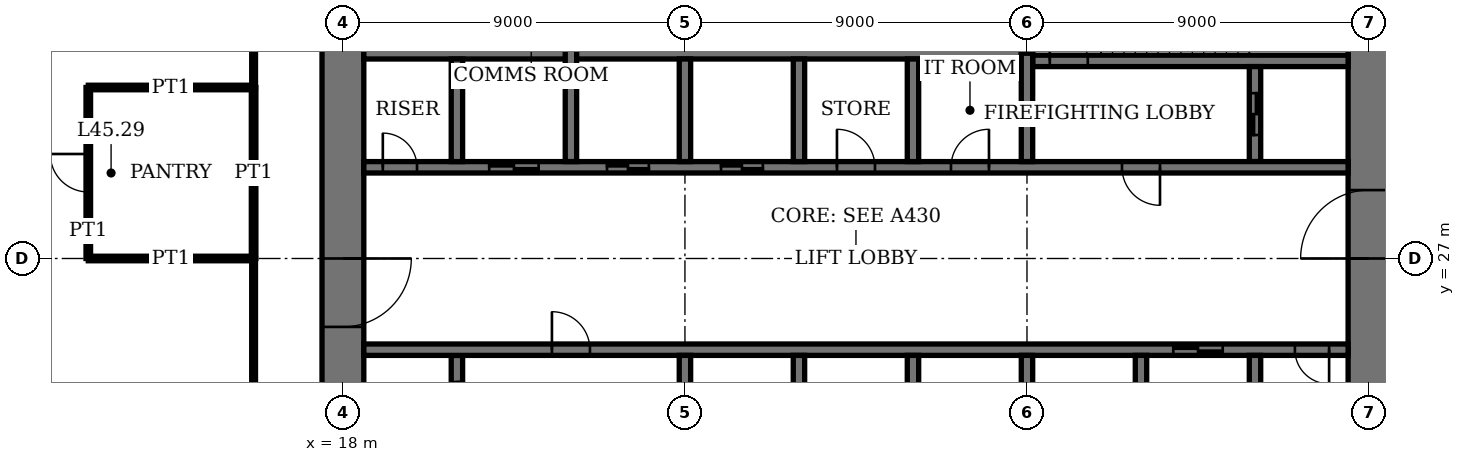
"""IFC4 building model, lengths in metres.
Left out: names, types, materials, properties, quantities, classifications, styles, units other than length and angle.
Written with IfcOpenShell. Run it as: python <this file> out.ifc"""

import sys

from ifc_helpers import new_model, si_unit, direction, frame, frame_2d, origin, place, context, subcontext, project, spatial, rectangle, extrude, element, fill, save


model = new_model("IFC4")
c1 = context("Model", 3, precision=1e-05, world=origin(), true_north=direction((0.0, 1.0)))
c2 = subcontext(c1, "Body", "Model", "MODEL_VIEW")
j1 = project(units=[si_unit("LENGTHUNIT", "METRE"), si_unit("PLANEANGLEUNIT", "RADIAN")], contexts=[c1])
p1 = place(None, origin())
s1 = spatial("IfcSite", under=j1, at=p1, CompositionType="ELEMENT")
p2 = place(p1, origin())
s2 = spatial("IfcBuilding", under=s1, at=p2, CompositionType="ELEMENT")
p3 = place(p2, frame((0.0, 0.0, 186.2)))
s3 = spatial("IfcBuildingStorey", under=s2, at=p3, CompositionType="ELEMENT", Elevation=186.2)
p4 = place(p3, frame((18.0, 35.45, 0.0), z_axis=(0.0, 0.0, 1.0), x_axis=(0.0, -1.0, 0.0)))
e1 = element("IfcWall", 1, at=p4, inside=s3, PredefinedType="SHEAR", context=c2, shape_type="SweptSolid", body=[
    extrude(rectangle(XDim=16.9, YDim=1.1, at=frame_2d((8.45, 0.0))), origin(), (0.0, 0.0, 1.0), 4.0),
])
p5 = place(p4, frame((8.45, 0.0, 0.0)))
e2 = element("IfcOpeningElement", 2, at=p5, cuts=e1, PredefinedType="OPENING", context=c2, shape_type="SweptSolid", body=[
    extrude(rectangle(XDim=1.8, YDim=2.4, at=frame_2d((0.9, 1.2))), frame((0.0, 0.56, 0.0), z_axis=(0.0, -1.0, 0.0), x_axis=(1.0, 0.0, 0.0)), (0.0, 0.0, 1.0), 1.12),
])
p6 = place(p3, frame((45.0, 18.55, 0.0), z_axis=(0.0, 0.0, 1.0), x_axis=(0.0, 1.0, 0.0)))
e3 = element("IfcWall", 3, at=p6, inside=s3, PredefinedType="SHEAR", context=c2, shape_type="SweptSolid", body=[
    extrude(rectangle(XDim=16.9, YDim=1.1, at=frame_2d((8.45, 0.0))), origin(), (0.0, 0.0, 1.0), 4.0),
])
p7 = place(p6, frame((8.45, 0.0, 0.0)))
e4 = element("IfcOpeningElement", 4, at=p7, cuts=e3, PredefinedType="OPENING", context=c2, shape_type="SweptSolid", body=[
    extrude(rectangle(XDim=1.8, YDim=2.4, at=frame_2d((0.9, 1.2))), frame((0.0, 0.56, 0.0), z_axis=(0.0, -1.0, 0.0), x_axis=(1.0, 0.0, 0.0)), (0.0, 0.0, 1.0), 1.12),
])
p8 = place(p3, frame((36.15, 32.2, 0.0), z_axis=(0.0, 0.0, 1.0), x_axis=(1.0, 0.0, 0.0)))
e5 = element("IfcWall", 5, at=p8, inside=s3, PredefinedType="SHEAR", context=c2, shape_type="SweptSolid", body=[
    extrude(rectangle(XDim=8.3, YDim=0.3, at=frame_2d((4.15, 0.0))), origin(), (0.0, 0.0, 1.0), 4.0),
])
p9 = place(p8, frame((0.45, 0.0, 0.0)))
e6 = element("IfcOpeningElement", 6, at=p9, cuts=e5, PredefinedType="OPENING", context=c2, shape_type="SweptSolid", body=[
    extrude(rectangle(XDim=1.0, YDim=2.4, at=frame_2d((0.5, 1.2))), frame((0.0, 0.16, 0.0), z_axis=(0.0, -1.0, 0.0), x_axis=(1.0, 0.0, 0.0)), (0.0, 0.0, 1.0), 0.32),
])
p10 = place(p3, frame((36.0, 32.4, 0.0), z_axis=(0.0, 0.0, 1.0), x_axis=(0.0, 1.0, 0.0)))
e7 = element("IfcWall", 7, at=p10, inside=s3, PredefinedType="SHEAR", context=c2, shape_type="SweptSolid", body=[
    extrude(rectangle(XDim=3.05, YDim=0.3, at=frame_2d((1.525, 0.0))), origin(), (0.0, 0.0, 1.0), 4.0),
])
p11 = place(p3, frame((21.0, 21.95, 0.0), z_axis=(0.0, 0.0, 1.0), x_axis=(0.0, 1.0, 0.0)))
e8 = element("IfcWall", 8, at=p11, inside=s3, PredefinedType="SHEAR", context=c2, shape_type="SweptSolid", body=[
    extrude(rectangle(XDim=2.5, YDim=0.3, at=frame_2d((1.25, 0.0))), origin(), (0.0, 0.0, 1.0), 4.0),
])
p12 = place(p11, frame((0.7, 0.0, 0.0)))
e9 = element("IfcOpeningElement", 9, at=p12, cuts=e8, PredefinedType="OPENING", context=c2, shape_type="SweptSolid", body=[
    extrude(rectangle(XDim=1.1, YDim=2.4, at=frame_2d((0.55, 1.2))), frame((0.0, 0.16, 0.0), z_axis=(0.0, -1.0, 0.0), x_axis=(1.0, 0.0, 0.0)), (0.0, 0.0, 1.0), 0.32),
])
p13 = place(p3, frame((42.0, 29.55, 0.0), z_axis=(0.0, 0.0, 1.0), x_axis=(0.0, 1.0, 0.0)))
e10 = element("IfcWall", 10, at=p13, inside=s3, PredefinedType="SHEAR", context=c2, shape_type="SweptSolid", body=[
    extrude(rectangle(XDim=2.5, YDim=0.3, at=frame_2d((1.25, 0.0))), origin(), (0.0, 0.0, 1.0), 4.0),
])
p14 = place(p13, frame((0.7, 0.0, 0.0)))
e11 = element("IfcOpeningElement", 11, at=p14, cuts=e10, PredefinedType="OPENING", context=c2, shape_type="SweptSolid", body=[
    extrude(rectangle(XDim=1.1, YDim=2.4, at=frame_2d((0.55, 1.2))), frame((0.0, 0.16, 0.0), z_axis=(0.0, -1.0, 0.0), x_axis=(1.0, 0.0, 0.0)), (0.0, 0.0, 1.0), 0.32),
])
p15 = place(p3, frame((18.55, 24.6, 0.0), z_axis=(0.0, 0.0, 1.0), x_axis=(1.0, 0.0, 0.0)))
e12 = element("IfcWall", 12, at=p15, inside=s3, PredefinedType="SHEAR", context=c2, shape_type="SweptSolid", body=[
    extrude(rectangle(XDim=25.9, YDim=0.3, at=frame_2d((12.95, 0.0))), origin(), (0.0, 0.0, 1.0), 4.0),
])
p16 = place(p15, frame((4.95, 0.0, 0.0)))
e13 = element("IfcOpeningElement", 13, at=p16, cuts=e12, PredefinedType="OPENING", context=c2, shape_type="SweptSolid", body=[
    extrude(rectangle(XDim=1.0, YDim=2.4, at=frame_2d((0.5, 1.2))), frame((0.0, 0.16, 0.0), z_axis=(0.0, -1.0, 0.0), x_axis=(1.0, 0.0, 0.0)), (0.0, 0.0, 1.0), 0.32),
])
p17 = place(p15, frame((24.5, 0.0, 0.0)))
e14 = element("IfcOpeningElement", 14, at=p17, cuts=e12, PredefinedType="OPENING", context=c2, shape_type="SweptSolid", body=[
    extrude(rectangle(XDim=0.9, YDim=2.1, at=frame_2d((0.45, 1.05))), frame((0.0, 0.16, 0.0), z_axis=(0.0, -1.0, 0.0), x_axis=(1.0, 0.0, 0.0)), (0.0, 0.0, 1.0), 0.32),
])
p18 = place(p15, frame((21.3, 0.0, 0.0)))
e15 = element("IfcOpeningElement", 15, at=p18, cuts=e12, PredefinedType="OPENING", context=c2, shape_type="SweptSolid", body=[
    extrude(rectangle(XDim=1.3, YDim=2.4, at=frame_2d((0.65, 1.2))), frame((0.0, 0.16, 0.0), z_axis=(0.0, -1.0, 0.0), x_axis=(1.0, 0.0, 0.0)), (0.0, 0.0, 1.0), 0.32),
])
p19 = place(p3, frame((18.55, 29.4, 0.0), z_axis=(0.0, 0.0, 1.0), x_axis=(1.0, 0.0, 0.0)))
e16 = element("IfcWall", 16, at=p19, inside=s3, PredefinedType="SHEAR", context=c2, shape_type="SweptSolid", body=[
    extrude(rectangle(XDim=25.9, YDim=0.3, at=frame_2d((12.95, 0.0))), origin(), (0.0, 0.0, 1.0), 4.0),
])
p20 = place(p19, frame((19.95, 0.0, 0.0)))
e17 = element("IfcOpeningElement", 17, at=p20, cuts=e16, PredefinedType="OPENING", context=c2, shape_type="SweptSolid", body=[
    extrude(rectangle(XDim=1.0, YDim=2.4, at=frame_2d((0.5, 1.2))), frame((0.0, 0.16, 0.0), z_axis=(0.0, -1.0, 0.0), x_axis=(1.0, 0.0, 0.0)), (0.0, 0.0, 1.0), 0.32),
])
p21 = place(p19, frame((0.5, 0.0, 0.0)))
e18 = element("IfcOpeningElement", 18, at=p21, cuts=e16, PredefinedType="OPENING", context=c2, shape_type="SweptSolid", body=[
    extrude(rectangle(XDim=0.9, YDim=2.1, at=frame_2d((0.45, 1.05))), frame((0.0, 0.16, 0.0), z_axis=(0.0, -1.0, 0.0), x_axis=(1.0, 0.0, 0.0)), (0.0, 0.0, 1.0), 0.32),
])
p22 = place(p19, frame((15.45, 0.0, 0.0)))
e19 = element("IfcOpeningElement", 19, at=p22, cuts=e16, PredefinedType="OPENING", context=c2, shape_type="SweptSolid", body=[
    extrude(rectangle(XDim=1.0, YDim=2.4, at=frame_2d((0.5, 1.2))), frame((0.0, 0.16, 0.0), z_axis=(0.0, -1.0, 0.0), x_axis=(1.0, 0.0, 0.0)), (0.0, 0.0, 1.0), 0.32),
])
p23 = place(p19, frame((12.45, 0.0, 0.0)))
e20 = element("IfcOpeningElement", 20, at=p23, cuts=e16, PredefinedType="OPENING", context=c2, shape_type="SweptSolid", body=[
    extrude(rectangle(XDim=1.0, YDim=2.4, at=frame_2d((0.5, 1.2))), frame((0.0, 0.16, 0.0), z_axis=(0.0, -1.0, 0.0), x_axis=(1.0, 0.0, 0.0)), (0.0, 0.0, 1.0), 0.32),
])
p24 = place(p19, frame((9.4, 0.0, 0.0)))
e21 = element("IfcOpeningElement", 21, at=p24, cuts=e16, PredefinedType="OPENING", context=c2, shape_type="SweptSolid", body=[
    extrude(rectangle(XDim=1.1, YDim=2.4, at=frame_2d((0.55, 1.2))), frame((0.0, 0.16, 0.0), z_axis=(0.0, -1.0, 0.0), x_axis=(1.0, 0.0, 0.0)), (0.0, 0.0, 1.0), 0.32),
])
p25 = place(p19, frame((6.4, 0.0, 0.0)))
e22 = element("IfcOpeningElement", 22, at=p25, cuts=e16, PredefinedType="OPENING", context=c2, shape_type="SweptSolid", body=[
    extrude(rectangle(XDim=1.1, YDim=2.4, at=frame_2d((0.55, 1.2))), frame((0.0, 0.16, 0.0), z_axis=(0.0, -1.0, 0.0), x_axis=(1.0, 0.0, 0.0)), (0.0, 0.0, 1.0), 0.32),
])
p26 = place(p19, frame((3.3, 0.0, 0.0)))
e23 = element("IfcOpeningElement", 23, at=p26, cuts=e16, PredefinedType="OPENING", context=c2, shape_type="SweptSolid", body=[
    extrude(rectangle(XDim=1.3, YDim=2.4, at=frame_2d((0.65, 1.2))), frame((0.0, 0.16, 0.0), z_axis=(0.0, -1.0, 0.0), x_axis=(1.0, 0.0, 0.0)), (0.0, 0.0, 1.0), 0.32),
])
p27 = place(p3, frame((18.55, 32.4, 0.0), z_axis=(0.0, 0.0, 1.0), x_axis=(1.0, 0.0, 0.0)))
e24 = element("IfcWall", 24, at=p27, inside=s3, PredefinedType="SHEAR", context=c2, shape_type="SweptSolid", body=[
    extrude(rectangle(XDim=17.3, YDim=0.3, at=frame_2d((8.65, 0.0))), origin(), (0.0, 0.0, 1.0), 4.0),
])
for number, where, z_axis, x_axis in (
    (25, (30.0, 21.75, 0.0), (0.0, 0.0, 1.0), (0.0, 1.0, 0.0)),
    (26, (33.0, 29.55, 0.0), (0.0, 0.0, 1.0), (0.0, 1.0, 0.0)),
    (27, (33.0, 21.75, 0.0), (0.0, 0.0, 1.0), (0.0, 1.0, 0.0)),
    (28, (30.0, 29.55, 0.0), (0.0, 0.0, 1.0), (0.0, 1.0, 0.0)),
    (29, (36.0, 21.75, 0.0), (0.0, 0.0, 1.0), (0.0, 1.0, 0.0)),
    (30, (27.0, 29.55, 0.0), (0.0, 0.0, 1.0), (0.0, 1.0, 0.0)),
):
    element("IfcWall", number, at=place(p3, frame(where, z_axis=z_axis, x_axis=x_axis)), inside=s3, PredefinedType="SHEAR", context=c2, shape_type="SweptSolid", body=[
        extrude(rectangle(XDim=2.7, YDim=0.3, at=frame_2d((1.35, 0.0))), origin(), (0.0, 0.0, 1.0), 4.0),
    ])
for number, where, z_axis, x_axis in (
    (31, (39.0, 18.55, 0.0), (0.0, 0.0, 1.0), (0.0, 1.0, 0.0)),
    (32, (24.0, 29.55, 0.0), (0.0, 0.0, 1.0), (0.0, 1.0, 0.0)),
):
    element("IfcWall", number, at=place(p3, frame(where, z_axis=z_axis, x_axis=x_axis)), inside=s3, PredefinedType="SHEAR", context=c2, shape_type="SweptSolid", body=[
        extrude(rectangle(XDim=5.9, YDim=0.3, at=frame_2d((2.95, 0.0))), origin(), (0.0, 0.0, 1.0), 4.0),
    ])
for number, where, z_axis, x_axis in (
    (33, (42.0, 21.75, 0.0), (0.0, 0.0, 1.0), (0.0, 1.0, 0.0)),
    (34, (21.0, 29.55, 0.0), (0.0, 0.0, 1.0), (0.0, 1.0, 0.0)),
):
    element("IfcWall", number, at=place(p3, frame(where, z_axis=z_axis, x_axis=x_axis)), inside=s3, PredefinedType="SHEAR", context=c2, shape_type="SweptSolid", body=[
        extrude(rectangle(XDim=2.7, YDim=0.3, at=frame_2d((1.35, 0.0))), origin(), (0.0, 0.0, 1.0), 4.0),
    ])
for number, where, z_axis, x_axis in (
    (35, (27.0, 21.6, 0.0), (0.0, 0.0, 1.0), (0.0, 1.0, 0.0)),
    (36, (36.0, 29.55, 0.0), (0.0, 0.0, 1.0), (0.0, 1.0, 0.0)),
):
    element("IfcWall", number, at=place(p3, frame(where, z_axis=z_axis, x_axis=x_axis)), inside=s3, PredefinedType="SHEAR", context=c2, shape_type="SweptSolid", body=[
        extrude(rectangle(XDim=2.85, YDim=0.3, at=frame_2d((1.425, 0.0))), origin(), (0.0, 0.0, 1.0), 4.0),
    ])
p28 = place(p3, frame((11.3, 27.0, 0.0), z_axis=(0.0, 0.0, 1.0), x_axis=(1.0, 0.0, 0.0)))
e37 = element("IfcWall", 37, at=p28, inside=s3, PredefinedType="PARTITIONING", context=c2, shape_type="SweptSolid", body=[
    extrude(rectangle(XDim=4.35, YDim=0.12, at=frame_2d((2.175, 0.0))), origin(), (0.0, 0.0, 1.0), 3.05),
])
p29 = place(p3, frame((11.3, 31.5, 0.0), z_axis=(0.0, 0.0, 1.0), x_axis=(1.0, 0.0, 0.0)))
e38 = element("IfcWall", 38, at=p29, inside=s3, PredefinedType="PARTITIONING", context=c2, shape_type="SweptSolid", body=[
    extrude(rectangle(XDim=4.35, YDim=0.12, at=frame_2d((2.175, 0.0))), origin(), (0.0, 0.0, 1.0), 3.1),
])
p30 = place(p3, frame((11.3, 27.0, 0.0), z_axis=(0.0, 0.0, 1.0), x_axis=(0.0, 1.0, 0.0)))
e39 = element("IfcWall", 39, at=p30, inside=s3, PredefinedType="PARTITIONING", context=c2, shape_type="SweptSolid", body=[
    extrude(rectangle(XDim=4.5, YDim=0.12, at=frame_2d((2.25, 0.0))), origin(), (0.0, 0.0, 1.0), 3.75),
])
p31 = place(p30, frame((1.75, 0.0, 0.0)))
e40 = element("IfcOpeningElement", 40, at=p31, cuts=e39, PredefinedType="OPENING", context=c2, shape_type="SweptSolid", body=[
    extrude(rectangle(XDim=1.0, YDim=2.4, at=frame_2d((0.5, 1.2))), frame((0.0, 0.07, 0.0), z_axis=(0.0, -1.0, 0.0), x_axis=(1.0, 0.0, 0.0)), (0.0, 0.0, 1.0), 0.14),
])
p32 = place(p3, frame((15.65, 27.0, 0.0), z_axis=(0.0, 0.0, 1.0), x_axis=(0.0, 1.0, 0.0)))
e41 = element("IfcWall", 41, at=p32, inside=s3, PredefinedType="PARTITIONING", context=c2, shape_type="SweptSolid", body=[
    extrude(rectangle(XDim=4.5, YDim=0.12, at=frame_2d((2.25, 0.0))), origin(), (0.0, 0.0, 1.0), 3.75),
])
p33 = place(p3, frame((15.65, 15.65, 0.0), z_axis=(0.0, 0.0, 1.0), x_axis=(0.0, 1.0, 0.0)))
e42 = element("IfcWall", 42, at=p33, inside=s3, PredefinedType="PARTITIONING", context=c2, shape_type="SweptSolid", body=[
    extrude(rectangle(XDim=11.35, YDim=0.1, at=frame_2d((5.675, 0.0))), origin(), (0.0, 0.0, 1.0), 3.75),
])
p34 = place(p33, frame((5.175, 0.0, 0.0)))
e43 = element("IfcOpeningElement", 43, at=p34, cuts=e42, PredefinedType="OPENING", context=c2, shape_type="SweptSolid", body=[
    extrude(rectangle(XDim=1.0, YDim=2.4, at=frame_2d((0.5, 1.2))), frame((0.0, 0.06, 0.0), z_axis=(0.0, -1.0, 0.0), x_axis=(1.0, 0.0, 0.0)), (0.0, 0.0, 1.0), 0.12),
])
p35 = place(p3, frame((15.65, 31.5, 0.0), z_axis=(0.0, 0.0, 1.0), x_axis=(0.0, 1.0, 0.0)))
e44 = element("IfcWall", 44, at=p35, inside=s3, PredefinedType="PARTITIONING", context=c2, shape_type="SweptSolid", body=[
    extrude(rectangle(XDim=6.85, YDim=0.1, at=frame_2d((3.425, 0.0))), origin(), (0.0, 0.0, 1.0), 3.75),
])
p36 = place(p5, origin())
e45 = element("IfcDoor", 45, at=p36, inside=s3, OperationType="DOUBLE_DOOR_DOUBLE_SWING", PredefinedType="DOOR", context=c2, shape_type="SweptSolid", body=[
    extrude(rectangle(XDim=1.8, YDim=2.4, at=frame_2d((0.9, 1.2))), frame((0.0, 0.03, 0.0), z_axis=(0.0, -1.0, 0.0), x_axis=(1.0, 0.0, 0.0)), (0.0, 0.0, 1.0), 0.06),
    extrude(rectangle(XDim=0.04, YDim=2.4, at=frame_2d((0.02, 1.2))), frame((0.0, 0.55, 0.0), z_axis=(0.0, -1.0, 0.0), x_axis=(1.0, 0.0, 0.0)), (0.0, 0.0, 1.0), 1.1),
    extrude(rectangle(XDim=0.04, YDim=2.4, at=frame_2d((1.78, 1.2))), frame((0.0, 0.55, 0.0), z_axis=(0.0, -1.0, 0.0), x_axis=(1.0, 0.0, 0.0)), (0.0, 0.0, 1.0), 1.1),
    extrude(rectangle(XDim=1.8, YDim=0.04, at=frame_2d((0.9, 2.38))), frame((0.0, 0.55, 0.0), z_axis=(0.0, -1.0, 0.0), x_axis=(1.0, 0.0, 0.0)), (0.0, 0.0, 1.0), 1.1),
])
fill(e2, e45)
p37 = place(p7, origin())
e46 = element("IfcDoor", 46, at=p37, inside=s3, OperationType="DOUBLE_DOOR_DOUBLE_SWING", PredefinedType="DOOR", context=c2, shape_type="SweptSolid", body=[
    extrude(rectangle(XDim=1.8, YDim=2.4, at=frame_2d((0.9, 1.2))), frame((0.0, 0.03, 0.0), z_axis=(0.0, -1.0, 0.0), x_axis=(1.0, 0.0, 0.0)), (0.0, 0.0, 1.0), 0.06),
    extrude(rectangle(XDim=0.04, YDim=2.4, at=frame_2d((0.02, 1.2))), frame((0.0, 0.55, 0.0), z_axis=(0.0, -1.0, 0.0), x_axis=(1.0, 0.0, 0.0)), (0.0, 0.0, 1.0), 1.1),
    extrude(rectangle(XDim=0.04, YDim=2.4, at=frame_2d((1.78, 1.2))), frame((0.0, 0.55, 0.0), z_axis=(0.0, -1.0, 0.0), x_axis=(1.0, 0.0, 0.0)), (0.0, 0.0, 1.0), 1.1),
    extrude(rectangle(XDim=1.8, YDim=0.04, at=frame_2d((0.9, 2.38))), frame((0.0, 0.55, 0.0), z_axis=(0.0, -1.0, 0.0), x_axis=(1.0, 0.0, 0.0)), (0.0, 0.0, 1.0), 1.1),
])
fill(e4, e46)
p38 = place(p9, origin())
e47 = element("IfcDoor", 47, at=p38, inside=s3, OperationType="SINGLE_SWING_RIGHT", PredefinedType="DOOR", context=c2, shape_type="SweptSolid", body=[
    extrude(rectangle(XDim=1.0, YDim=2.4, at=frame_2d((0.5, 1.2))), frame((0.0, 0.03, 0.0), z_axis=(0.0, -1.0, 0.0), x_axis=(1.0, 0.0, 0.0)), (0.0, 0.0, 1.0), 0.06),
])
fill(e6, e47)
p39 = place(p16, origin())
e48 = element("IfcDoor", 48, at=p39, inside=s3, OperationType="SINGLE_SWING_RIGHT", PredefinedType="DOOR", context=c2, shape_type="SweptSolid", body=[
    extrude(rectangle(XDim=1.0, YDim=2.4, at=frame_2d((0.5, 1.2))), frame((0.0, 0.03, 0.0), z_axis=(0.0, -1.0, 0.0), x_axis=(1.0, 0.0, 0.0)), (0.0, 0.0, 1.0), 0.06),
])
fill(e13, e48)
p40 = place(p20, origin())
e49 = element("IfcDoor", 49, at=p40, inside=s3, OperationType="SINGLE_SWING_RIGHT", PredefinedType="DOOR", context=c2, shape_type="SweptSolid", body=[
    extrude(rectangle(XDim=1.0, YDim=2.4, at=frame_2d((0.5, 1.2))), frame((0.0, 0.03, 0.0), z_axis=(0.0, -1.0, 0.0), x_axis=(1.0, 0.0, 0.0)), (0.0, 0.0, 1.0), 0.06),
])
fill(e17, e49)
p41 = place(p17, origin())
e50 = element("IfcDoor", 50, at=p41, inside=s3, OperationType="SINGLE_SWING_RIGHT", PredefinedType="DOOR", context=c2, shape_type="SweptSolid", body=[
    extrude(rectangle(XDim=0.9, YDim=2.1, at=frame_2d((0.45, 1.05))), frame((0.0, 0.03, 0.0), z_axis=(0.0, -1.0, 0.0), x_axis=(1.0, 0.0, 0.0)), (0.0, 0.0, 1.0), 0.06),
])
fill(e14, e50)
p42 = place(p21, origin())
e51 = element("IfcDoor", 51, at=p42, inside=s3, OperationType="SINGLE_SWING_RIGHT", PredefinedType="DOOR", context=c2, shape_type="SweptSolid", body=[
    extrude(rectangle(XDim=0.9, YDim=2.1, at=frame_2d((0.45, 1.05))), frame((0.0, 0.03, 0.0), z_axis=(0.0, -1.0, 0.0), x_axis=(1.0, 0.0, 0.0)), (0.0, 0.0, 1.0), 0.06),
])
fill(e18, e51)
p43 = place(p31, origin())
e52 = element("IfcDoor", 52, at=p43, inside=s3, OperationType="SINGLE_SWING_LEFT", PredefinedType="DOOR", context=c2, shape_type="SweptSolid", body=[
    extrude(rectangle(XDim=1.0, YDim=2.4, at=frame_2d((0.5, 1.2))), frame((0.0, 0.025, 0.0), z_axis=(0.0, -1.0, 0.0), x_axis=(1.0, 0.0, 0.0)), (0.0, 0.0, 1.0), 0.05),
])
fill(e40, e52)
p44 = place(p22, origin())
e53 = element("IfcDoor", 53, at=p44, inside=s3, OperationType="SINGLE_SWING_LEFT", PredefinedType="DOOR", context=c2, shape_type="SweptSolid", body=[
    extrude(rectangle(XDim=1.0, YDim=2.4, at=frame_2d((0.5, 1.2))), frame((0.0, 0.03, 0.0), z_axis=(0.0, -1.0, 0.0), x_axis=(1.0, 0.0, 0.0)), (0.0, 0.0, 1.0), 0.06),
])
fill(e19, e53)
p45 = place(p23, origin())
e54 = element("IfcDoor", 54, at=p45, inside=s3, OperationType="SINGLE_SWING_RIGHT", PredefinedType="DOOR", context=c2, shape_type="SweptSolid", body=[
    extrude(rectangle(XDim=1.0, YDim=2.4, at=frame_2d((0.5, 1.2))), frame((0.0, 0.03, 0.0), z_axis=(0.0, -1.0, 0.0), x_axis=(1.0, 0.0, 0.0)), (0.0, 0.0, 1.0), 0.06),
])
fill(e20, e54)
p46 = place(p24, origin())
e55 = element("IfcDoor", 55, at=p46, inside=s3, OperationType="DOUBLE_DOOR_SLIDING", PredefinedType="DOOR", context=c2, shape_type="SweptSolid", body=[
    extrude(rectangle(XDim=1.1, YDim=2.4, at=frame_2d((0.55, 1.2))), frame((0.0, 0.02, 0.0), z_axis=(0.0, -1.0, 0.0), x_axis=(1.0, 0.0, 0.0)), (0.0, 0.0, 1.0), 0.04),
])
fill(e21, e55)
p47 = place(p25, origin())
e56 = element("IfcDoor", 56, at=p47, inside=s3, OperationType="DOUBLE_DOOR_SLIDING", PredefinedType="DOOR", context=c2, shape_type="SweptSolid", body=[
    extrude(rectangle(XDim=1.1, YDim=2.4, at=frame_2d((0.55, 1.2))), frame((0.0, 0.02, 0.0), z_axis=(0.0, -1.0, 0.0), x_axis=(1.0, 0.0, 0.0)), (0.0, 0.0, 1.0), 0.04),
])
fill(e22, e56)
p48 = place(p18, origin())
e57 = element("IfcDoor", 57, at=p48, inside=s3, OperationType="DOUBLE_DOOR_SLIDING", PredefinedType="DOOR", context=c2, shape_type="SweptSolid", body=[
    extrude(rectangle(XDim=1.3, YDim=2.4, at=frame_2d((0.65, 1.2))), frame((0.0, 0.02, 0.0), z_axis=(0.0, -1.0, 0.0), x_axis=(1.0, 0.0, 0.0)), (0.0, 0.0, 1.0), 0.04),
])
fill(e15, e57)
p49 = place(p26, origin())
e58 = element("IfcDoor", 58, at=p49, inside=s3, OperationType="DOUBLE_DOOR_SLIDING", PredefinedType="DOOR", context=c2, shape_type="SweptSolid", body=[
    extrude(rectangle(XDim=1.3, YDim=2.4, at=frame_2d((0.65, 1.2))), frame((0.0, 0.02, 0.0), z_axis=(0.0, -1.0, 0.0), x_axis=(1.0, 0.0, 0.0)), (0.0, 0.0, 1.0), 0.04),
])
fill(e23, e58)
p50 = place(p14, origin())
e59 = element("IfcDoor", 59, at=p50, inside=s3, OperationType="DOUBLE_DOOR_SLIDING", PredefinedType="DOOR", context=c2, shape_type="SweptSolid", body=[
    extrude(rectangle(XDim=1.1, YDim=2.4, at=frame_2d((0.55, 1.2))), frame((0.0, 0.03, 0.0), z_axis=(0.0, -1.0, 0.0), x_axis=(1.0, 0.0, 0.0)), (0.0, 0.0, 1.0), 0.06),
])
fill(e11, e59)
save(model, sys.argv[1])
